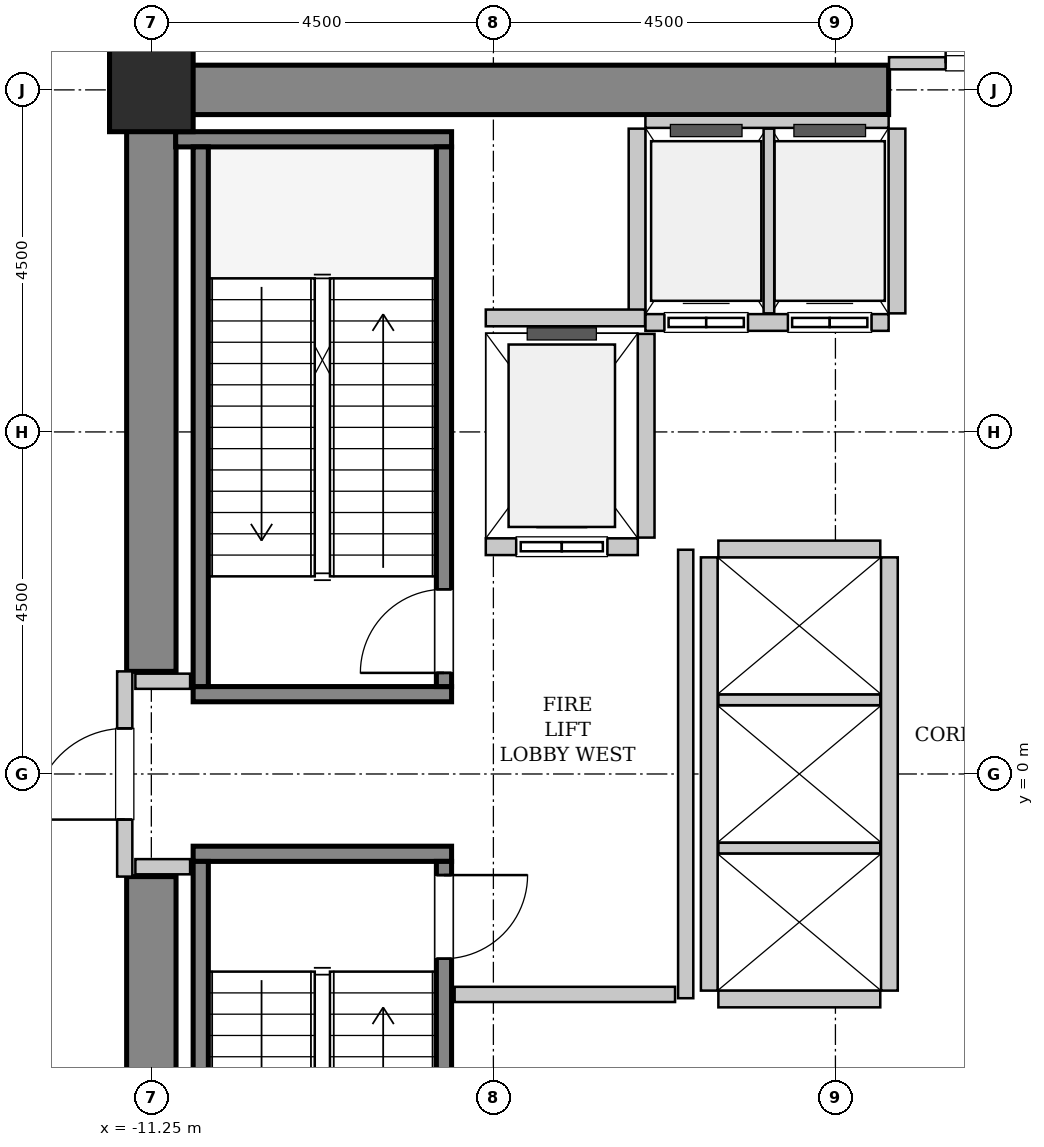
"""IFC4 building model, lengths in metres.
Left out: names, types, materials, properties, quantities, classifications, styles, units other than length and angle.
Written with IfcOpenShell. Run it as: python <this file> out.ifc"""

import sys

from ifc_helpers import new_model, si_unit, direction, frame, frame_2d, origin, origin_2d, place, context, subcontext, project, spatial, rectangle, hollow_rectangle, extrude, source, transform, mapped, element, fill, save


model = new_model("IFC4")
c1 = context("Model", 3, precision=1e-05, world=origin(), true_north=direction((0.0, 1.0)))
c2 = subcontext(c1, "Body", "Model", "MODEL_VIEW")
j1 = project(units=[si_unit("LENGTHUNIT", "METRE"), si_unit("PLANEANGLEUNIT", "RADIAN")], contexts=[c1])
p1 = place(None, origin())
s1 = spatial("IfcSite", under=j1, at=p1, CompositionType="ELEMENT")
p2 = place(p1, origin())
s2 = spatial("IfcBuilding", under=s1, at=p2, CompositionType="ELEMENT")
p3 = place(p2, frame((0.0, 0.0, 27.6)))
s3 = spatial("IfcBuildingStorey", under=s2, at=p3, CompositionType="ELEMENT", Elevation=27.6)
m1 = source(origin(), c2, "Body", "SweptSolid", [
    extrude(rectangle(XDim=10.025, YDim=0.65, at=frame_2d((5.012, 0.0))), origin(), (0.0, 0.0, 1.0), 5.4),
])
p4 = place(p3, frame((-11.575, 9.0, 0.0), z_axis=(0.0, 0.0, 1.0), x_axis=(1.0, 0.0, 0.0)))
e1 = element("IfcWall", 1, at=p4, inside=s3, PredefinedType="SHEAR", context=c2, shape_type="MappedRepresentation", body=[
    mapped(m1, transform((0.0, 0.0, 0.0), x_axis=(1.0, 0.0, 0.0), y_axis=(0.0, 1.0, 0.0), z_axis=(0.0, 0.0, 1.0), scale=1.0)),
])
m2 = source(origin(), c2, "Body", "SweptSolid", [
    extrude(rectangle(XDim=7.325, YDim=0.65, at=frame_2d((3.663, 0.0))), origin(), (0.0, 0.0, 1.0), 5.4),
])
for number, where, z_axis, x_axis in (
    (2, (-11.25, -8.675, 0.0), (0.0, 0.0, 1.0), (0.0, 1.0, 0.0)),
    (3, (-11.25, 1.35, 0.0), (0.0, 0.0, 1.0), (0.0, 1.0, 0.0)),
):
    element("IfcWall", number, at=place(p3, frame(where, z_axis=z_axis, x_axis=x_axis)), inside=s3, PredefinedType="SHEAR", context=c2, shape_type="MappedRepresentation", body=[
        mapped(m2, transform((0.0, 0.0, 0.0), x_axis=(1.0, 0.0, 0.0), y_axis=(0.0, 1.0, 0.0), z_axis=(0.0, 0.0, 1.0), scale=1.0)),
    ])
m3 = source(origin(), c2, "Body", "SweptSolid", [
    extrude(hollow_rectangle(XDim=1.1, YDim=1.1, WallThickness=0.055, InnerFilletRadius=0.055, OuterFilletRadius=0.11, at=origin_2d()), origin(), (0.0, 0.0, 1.0), 5.4),
])
p5 = place(p3, frame((-11.25, 9.0, 0.0), z_axis=(0.0, 0.0, 1.0), x_axis=(1.0, 0.0, 0.0)))
e4 = element("IfcColumn", 4, at=p5, inside=s3, PredefinedType="COLUMN", context=c2, shape_type="MappedRepresentation", body=[
    mapped(m3, transform((0.0, 0.0, 0.0), x_axis=(1.0, 0.0, 0.0), y_axis=(0.0, 1.0, 0.0), z_axis=(0.0, 0.0, 1.0), scale=1.0)),
])
m4 = source(origin(), c2, "Body", "SweptSolid", [
    extrude(rectangle(XDim=3.4, YDim=0.2, at=frame_2d((1.7, 0.0))), origin(), (0.0, 0.0, 1.0), 5.4),
])
p6 = place(p3, frame((-7.3, 1.05, 0.0), z_axis=(0.0, 0.0, 1.0), x_axis=(-1.0, 0.0, 0.0)))
e5 = element("IfcWall", 5, at=p6, inside=s3, PredefinedType="SOLIDWALL", context=c2, shape_type="MappedRepresentation", body=[
    mapped(m4, transform((0.0, 0.0, 0.0), x_axis=(1.0, 0.0, 0.0), y_axis=(0.0, 1.0, 0.0), z_axis=(0.0, 0.0, 1.0), scale=1.0)),
])
m5 = source(origin(), c2, "Body", "SweptSolid", [
    extrude(rectangle(XDim=3.63, YDim=0.2, at=frame_2d((1.815, 0.0))), origin(), (0.0, 0.0, 1.0), 5.4),
])
p7 = place(p3, frame((-7.3, 8.35, 0.0), z_axis=(0.0, 0.0, 1.0), x_axis=(-1.0, 0.0, 0.0)))
e6 = element("IfcWall", 6, at=p7, inside=s3, PredefinedType="SOLIDWALL", context=c2, shape_type="MappedRepresentation", body=[
    mapped(m5, transform((0.0, 0.0, 0.0), x_axis=(1.0, 0.0, 0.0), y_axis=(0.0, 1.0, 0.0), z_axis=(0.0, 0.0, 1.0), scale=1.0)),
])
m6 = source(origin(), c2, "Body", "SweptSolid", [
    extrude(rectangle(XDim=7.1, YDim=0.2, at=frame_2d((3.55, 0.0))), origin(), (0.0, 0.0, 1.0), 5.4),
])
p8 = place(p3, frame((-7.4, 1.15, 0.0), z_axis=(0.0, 0.0, 1.0), x_axis=(0.0, 1.0, 0.0)))
e7 = element("IfcWall", 7, at=p8, inside=s3, PredefinedType="SOLIDWALL", context=c2, shape_type="MappedRepresentation", body=[
    mapped(m6, transform((0.0, 0.0, 0.0), x_axis=(1.0, 0.0, 0.0), y_axis=(0.0, 1.0, 0.0), z_axis=(0.0, 0.0, 1.0), scale=1.0)),
])
p9 = place(p8, frame((0.18, 0.0, 0.0)))
e8 = element("IfcOpeningElement", 8, at=p9, cuts=e7, PredefinedType="OPENING", context=c2, shape_type="SweptSolid", body=[
    extrude(rectangle(XDim=1.1, YDim=2.15, at=frame_2d((0.55, 1.075))), frame((0.0, 0.11, 0.0), z_axis=(0.0, -1.0, 0.0), x_axis=(1.0, 0.0, 0.0)), (0.0, 0.0, 1.0), 0.22),
])
p10 = place(p3, frame((-10.6, 1.15, 0.0), z_axis=(0.0, 0.0, 1.0), x_axis=(0.0, 1.0, 0.0)))
e9 = element("IfcWall", 9, at=p10, inside=s3, PredefinedType="SOLIDWALL", context=c2, shape_type="MappedRepresentation", body=[
    mapped(m6, transform((0.0, 0.0, 0.0), x_axis=(1.0, 0.0, 0.0), y_axis=(0.0, 1.0, 0.0), z_axis=(0.0, 0.0, 1.0), scale=1.0)),
])
p11 = place(p3, frame((-10.7, -1.05, 0.0), z_axis=(0.0, 0.0, 1.0), x_axis=(1.0, 0.0, 0.0)))
e10 = element("IfcWall", 10, at=p11, inside=s3, PredefinedType="SOLIDWALL", context=c2, shape_type="MappedRepresentation", body=[
    mapped(m4, transform((0.0, 0.0, 0.0), x_axis=(1.0, 0.0, 0.0), y_axis=(0.0, 1.0, 0.0), z_axis=(0.0, 0.0, 1.0), scale=1.0)),
])
p12 = place(p3, frame((-10.6, -1.15, 0.0), z_axis=(0.0, 0.0, 1.0), x_axis=(0.0, -1.0, 0.0)))
e11 = element("IfcWall", 11, at=p12, inside=s3, PredefinedType="SOLIDWALL", context=c2, shape_type="MappedRepresentation", body=[
    mapped(m6, transform((0.0, 0.0, 0.0), x_axis=(1.0, 0.0, 0.0), y_axis=(0.0, 1.0, 0.0), z_axis=(0.0, 0.0, 1.0), scale=1.0)),
])
p13 = place(p3, frame((-7.4, -1.15, 0.0), z_axis=(0.0, 0.0, 1.0), x_axis=(0.0, -1.0, 0.0)))
e12 = element("IfcWall", 12, at=p13, inside=s3, PredefinedType="SOLIDWALL", context=c2, shape_type="MappedRepresentation", body=[
    mapped(m6, transform((0.0, 0.0, 0.0), x_axis=(1.0, 0.0, 0.0), y_axis=(0.0, 1.0, 0.0), z_axis=(0.0, 0.0, 1.0), scale=1.0)),
])
p14 = place(p13, frame((0.18, 0.0, 0.0)))
e13 = element("IfcOpeningElement", 13, at=p14, cuts=e12, PredefinedType="OPENING", context=c2, shape_type="SweptSolid", body=[
    extrude(rectangle(XDim=1.1, YDim=2.15, at=frame_2d((0.55, 1.075))), frame((0.0, 0.11, 0.0), z_axis=(0.0, -1.0, 0.0), x_axis=(1.0, 0.0, 0.0)), (0.0, 0.0, 1.0), 0.22),
])
m7 = source(origin(), c2, "Body", "SweptSolid", [
    extrude(rectangle(XDim=2.0, YDim=0.22, at=frame_2d((1.0, 0.0))), origin(), (0.0, 0.0, 1.0), 5.135),
])
p15 = place(p3, frame((-6.85, 2.99, 0.0), z_axis=(0.0, 0.0, 1.0), x_axis=(1.0, 0.0, 0.0)))
e14 = element("IfcWall", 14, at=p15, inside=s3, PredefinedType="SOLIDWALL", context=c2, shape_type="MappedRepresentation", body=[
    mapped(m7, transform((0.0, 0.0, 0.0), x_axis=(1.0, 0.0, 0.0), y_axis=(0.0, 1.0, 0.0), z_axis=(0.0, 0.0, 1.0), scale=1.0)),
])
p16 = place(p15, frame((0.4, 0.0, 0.0)))
e15 = element("IfcOpeningElement", 15, at=p16, cuts=e14, PredefinedType="OPENING", context=c2, shape_type="SweptSolid", body=[
    extrude(rectangle(XDim=1.2, YDim=2.2, at=frame_2d((0.6, 1.1))), frame((0.0, 0.12, 0.0), z_axis=(0.0, -1.0, 0.0), x_axis=(1.0, 0.0, 0.0)), (0.0, 0.0, 1.0), 0.24),
])
m8 = source(origin(), c2, "Body", "SweptSolid", [
    extrude(rectangle(XDim=2.68, YDim=0.22, at=frame_2d((1.34, 0.0))), origin(), (0.0, 0.0, 1.0), 5.135),
])
p17 = place(p3, frame((-4.74, 3.11, 0.0), z_axis=(0.0, 0.0, 1.0), x_axis=(0.0, 1.0, 0.0)))
e16 = element("IfcWall", 16, at=p17, inside=s3, PredefinedType="SOLIDWALL", context=c2, shape_type="MappedRepresentation", body=[
    mapped(m8, transform((0.0, 0.0, 0.0), x_axis=(1.0, 0.0, 0.0), y_axis=(0.0, 1.0, 0.0), z_axis=(0.0, 0.0, 1.0), scale=1.0)),
])
m9 = source(origin(), c2, "Body", "SweptSolid", [
    extrude(rectangle(XDim=3.2, YDim=0.22, at=frame_2d((1.6, 0.0))), origin(), (0.0, 0.0, 1.0), 5.135),
])
p18 = place(p3, frame((-4.75, 5.94, 0.0), z_axis=(0.0, 0.0, 1.0), x_axis=(1.0, 0.0, 0.0)))
e17 = element("IfcWall", 17, at=p18, inside=s3, PredefinedType="SOLIDWALL", context=c2, shape_type="MappedRepresentation", body=[
    mapped(m9, transform((0.0, 0.0, 0.0), x_axis=(1.0, 0.0, 0.0), y_axis=(0.0, 1.0, 0.0), z_axis=(0.0, 0.0, 1.0), scale=1.0)),
])
p19 = place(p18, frame((0.25, 0.0, 0.0)))
e18 = element("IfcOpeningElement", 18, at=p19, cuts=e17, PredefinedType="OPENING", context=c2, shape_type="SweptSolid", body=[
    extrude(rectangle(XDim=1.1, YDim=2.2, at=frame_2d((0.55, 1.1))), frame((0.0, 0.12, 0.0), z_axis=(0.0, -1.0, 0.0), x_axis=(1.0, 0.0, 0.0)), (0.0, 0.0, 1.0), 0.24),
])
p20 = place(p18, frame((1.875, 0.0, 0.0)))
e19 = element("IfcOpeningElement", 19, at=p20, cuts=e17, PredefinedType="OPENING", context=c2, shape_type="SweptSolid", body=[
    extrude(rectangle(XDim=1.1, YDim=2.2, at=frame_2d((0.55, 1.1))), frame((0.0, 0.12, 0.0), z_axis=(0.0, -1.0, 0.0), x_axis=(1.0, 0.0, 0.0)), (0.0, 0.0, 1.0), 0.24),
])
m10 = source(origin(), c2, "Body", "SweptSolid", [
    extrude(rectangle(XDim=3.2, YDim=0.16, at=frame_2d((1.6, 0.0))), origin(), (0.0, 0.0, 1.0), 4.025),
])
p21 = place(p3, frame((-1.55, 8.58, 0.0), z_axis=(0.0, 0.0, 1.0), x_axis=(-1.0, 0.0, 0.0)))
e20 = element("IfcWall", 20, at=p21, inside=s3, PredefinedType="PARTITIONING", context=c2, shape_type="MappedRepresentation", body=[
    mapped(m10, transform((0.0, 0.0, 0.0), x_axis=(1.0, 0.0, 0.0), y_axis=(0.0, 1.0, 0.0), z_axis=(0.0, 0.0, 1.0), scale=1.0)),
])
m11 = source(origin(), c2, "Body", "SweptSolid", [
    extrude(rectangle(XDim=2.43, YDim=0.22, at=frame_2d((1.215, 0.0))), origin(), (0.0, 0.0, 1.0), 5.135),
])
p22 = place(p3, frame((-4.86, 8.49, 0.0), z_axis=(0.0, 0.0, 1.0), x_axis=(0.0, -1.0, 0.0)))
e21 = element("IfcWall", 21, at=p22, inside=s3, PredefinedType="SOLIDWALL", context=c2, shape_type="MappedRepresentation", body=[
    mapped(m11, transform((0.0, 0.0, 0.0), x_axis=(1.0, 0.0, 0.0), y_axis=(0.0, 1.0, 0.0), z_axis=(0.0, 0.0, 1.0), scale=1.0)),
])
m12 = source(origin(), c2, "Body", "SweptSolid", [
    extrude(rectangle(XDim=2.43, YDim=0.14, at=frame_2d((1.215, 0.0))), origin(), (0.0, 0.0, 1.0), 5.135),
])
p23 = place(p3, frame((-3.125, 6.06, 0.0), z_axis=(0.0, 0.0, 1.0), x_axis=(0.0, 1.0, 0.0)))
e22 = element("IfcWall", 22, at=p23, inside=s3, PredefinedType="PARTITIONING", context=c2, shape_type="MappedRepresentation", body=[
    mapped(m12, transform((0.0, 0.0, 0.0), x_axis=(1.0, 0.0, 0.0), y_axis=(0.0, 1.0, 0.0), z_axis=(0.0, 0.0, 1.0), scale=1.0)),
])
p24 = place(p3, frame((-1.44, 6.06, 0.0), z_axis=(0.0, 0.0, 1.0), x_axis=(0.0, 1.0, 0.0)))
e23 = element("IfcWall", 23, at=p24, inside=s3, PredefinedType="SOLIDWALL", context=c2, shape_type="MappedRepresentation", body=[
    mapped(m11, transform((0.0, 0.0, 0.0), x_axis=(1.0, 0.0, 0.0), y_axis=(0.0, 1.0, 0.0), z_axis=(0.0, 0.0, 1.0), scale=1.0)),
])
m13 = source(origin(), c2, "Body", "SweptSolid", [
    extrude(rectangle(XDim=5.7, YDim=0.22, at=frame_2d((2.85, 0.0))), origin(), (0.0, 0.0, 1.0), 5.135),
])
for number, where, z_axis, x_axis in (
    (24, (-1.54, -2.85, 0.0), (0.0, 0.0, 1.0), (0.0, 1.0, 0.0)),
    (25, (-3.91, 2.85, 0.0), (0.0, 0.0, 1.0), (0.0, -1.0, 0.0)),
):
    element("IfcWall", number, at=place(p3, frame(where, z_axis=z_axis, x_axis=x_axis)), inside=s3, PredefinedType="SOLIDWALL", context=c2, shape_type="MappedRepresentation", body=[
        mapped(m13, transform((0.0, 0.0, 0.0), x_axis=(1.0, 0.0, 0.0), y_axis=(0.0, 1.0, 0.0), z_axis=(0.0, 0.0, 1.0), scale=1.0)),
    ])
m14 = source(origin(), c2, "Body", "SweptSolid", [
    extrude(rectangle(XDim=2.13, YDim=0.22, at=frame_2d((1.065, 0.0))), origin(), (0.0, 0.0, 1.0), 5.135),
])
p25 = place(p3, frame((-3.79, -2.96, 0.0), z_axis=(0.0, 0.0, 1.0), x_axis=(1.0, 0.0, 0.0)))
e26 = element("IfcWall", 26, at=p25, inside=s3, PredefinedType="SOLIDWALL", context=c2, shape_type="MappedRepresentation", body=[
    mapped(m14, transform((0.0, 0.0, 0.0), x_axis=(1.0, 0.0, 0.0), y_axis=(0.0, 1.0, 0.0), z_axis=(0.0, 0.0, 1.0), scale=1.0)),
])
m15 = source(origin(), c2, "Body", "SweptSolid", [
    extrude(rectangle(XDim=2.13, YDim=0.14, at=frame_2d((1.065, 0.0))), origin(), (0.0, 0.0, 1.0), 5.135),
])
for number, where, z_axis, x_axis in (
    (27, (-3.79, -0.975, 0.0), (0.0, 0.0, 1.0), (1.0, 0.0, 0.0)),
    (28, (-3.79, 0.975, 0.0), (0.0, 0.0, 1.0), (1.0, 0.0, 0.0)),
):
    element("IfcWall", number, at=place(p3, frame(where, z_axis=z_axis, x_axis=x_axis)), inside=s3, PredefinedType="PARTITIONING", context=c2, shape_type="MappedRepresentation", body=[
        mapped(m15, transform((0.0, 0.0, 0.0), x_axis=(1.0, 0.0, 0.0), y_axis=(0.0, 1.0, 0.0), z_axis=(0.0, 0.0, 1.0), scale=1.0)),
    ])
p26 = place(p3, frame((-1.66, 2.96, 0.0), z_axis=(0.0, 0.0, 1.0), x_axis=(-1.0, 0.0, 0.0)))
e29 = element("IfcWall", 29, at=p26, inside=s3, PredefinedType="SOLIDWALL", context=c2, shape_type="MappedRepresentation", body=[
    mapped(m14, transform((0.0, 0.0, 0.0), x_axis=(1.0, 0.0, 0.0), y_axis=(0.0, 1.0, 0.0), z_axis=(0.0, 0.0, 1.0), scale=1.0)),
])
m16 = source(origin(), c2, "Body", "SweptSolid", [
    extrude(rectangle(XDim=2.095, YDim=0.22, at=frame_2d((1.048, 0.0))), origin(), (0.0, 0.0, 1.0), 5.135),
])
p27 = place(p3, frame((-6.85, 6.0, 0.0), z_axis=(0.0, 0.0, 1.0), x_axis=(1.0, 0.0, 0.0)))
e30 = element("IfcWall", 30, at=p27, inside=s3, PredefinedType="SOLIDWALL", context=c2, shape_type="MappedRepresentation", body=[
    mapped(m16, transform((0.0, 0.0, 0.0), x_axis=(1.0, 0.0, 0.0), y_axis=(0.0, 1.0, 0.0), z_axis=(0.0, 0.0, 1.0), scale=1.0)),
])
m17 = source(origin(), c2, "Body", "SweptSolid", [
    extrude(rectangle(XDim=2.7, YDim=0.2, at=frame_2d((1.35, 0.0))), origin(), (0.0, 0.0, 1.0), 4.025),
])
p28 = place(p3, frame((-11.6, -1.35, 0.0), z_axis=(0.0, 0.0, 1.0), x_axis=(0.0, 1.0, 0.0)))
e31 = element("IfcWall", 31, at=p28, inside=s3, PredefinedType="PARTITIONING", context=c2, shape_type="MappedRepresentation", body=[
    mapped(m17, transform((0.0, 0.0, 0.0), x_axis=(1.0, 0.0, 0.0), y_axis=(0.0, 1.0, 0.0), z_axis=(0.0, 0.0, 1.0), scale=1.0)),
])
p29 = place(p28, frame((0.75, 0.0, 0.0)))
e32 = element("IfcOpeningElement", 32, at=p29, cuts=e31, PredefinedType="OPENING", context=c2, shape_type="SweptSolid", body=[
    extrude(rectangle(XDim=1.2, YDim=2.15, at=frame_2d((0.6, 1.075))), frame((0.0, 0.11, 0.0), z_axis=(0.0, -1.0, 0.0), x_axis=(1.0, 0.0, 0.0)), (0.0, 0.0, 1.0), 0.22),
])
m18 = source(origin(), c2, "Body", "SweptSolid", [
    extrude(rectangle(XDim=5.9, YDim=0.2, at=frame_2d((2.95, 0.0))), origin(), (0.0, 0.0, 1.0), 5.135),
])
p30 = place(p3, frame((-4.22, -2.95, 0.0), z_axis=(0.0, 0.0, 1.0), x_axis=(0.0, 1.0, 0.0)))
e33 = element("IfcWall", 33, at=p30, inside=s3, PredefinedType="PARTITIONING", context=c2, shape_type="MappedRepresentation", body=[
    mapped(m18, transform((0.0, 0.0, 0.0), x_axis=(1.0, 0.0, 0.0), y_axis=(0.0, 1.0, 0.0), z_axis=(0.0, 0.0, 1.0), scale=1.0)),
])
m19 = source(origin(), c2, "Body", "SweptSolid", [
    extrude(rectangle(XDim=2.9, YDim=0.2, at=frame_2d((1.45, 0.0))), origin(), (0.0, 0.0, 1.0), 5.135),
])
p31 = place(p3, frame((-7.26, -2.9, 0.0), z_axis=(0.0, 0.0, 1.0), x_axis=(1.0, 0.0, 0.0)))
e34 = element("IfcWall", 34, at=p31, inside=s3, PredefinedType="PARTITIONING", context=c2, shape_type="MappedRepresentation", body=[
    mapped(m19, transform((0.0, 0.0, 0.0), x_axis=(1.0, 0.0, 0.0), y_axis=(0.0, 1.0, 0.0), z_axis=(0.0, 0.0, 1.0), scale=1.0)),
])
m20 = source(origin(), c2, "Body", "SweptSolid", [
    extrude(rectangle(XDim=0.72, YDim=0.2, at=frame_2d((0.36, 0.0))), origin(), (0.0, 0.0, 1.0), 5.135),
])
for number, where, z_axis, x_axis in (
    (35, (-11.46, 1.22, 0.0), (0.0, 0.0, 1.0), (1.0, 0.0, 0.0)),
    (36, (-11.46, -1.22, 0.0), (0.0, 0.0, 1.0), (1.0, 0.0, 0.0)),
):
    element("IfcWall", number, at=place(p3, frame(where, z_axis=z_axis, x_axis=x_axis)), inside=s3, PredefinedType="PARTITIONING", context=c2, shape_type="MappedRepresentation", body=[
        mapped(m20, transform((0.0, 0.0, 0.0), x_axis=(1.0, 0.0, 0.0), y_axis=(0.0, 1.0, 0.0), z_axis=(0.0, 0.0, 1.0), scale=1.0)),
    ])
m21 = source(origin(), c2, "Body", "SweptSolid", [
    extrude(rectangle(XDim=3.09, YDim=0.16, at=frame_2d((1.545, 0.0))), origin(), (0.0, 0.0, 1.0), 4.025),
])
p32 = place(p3, frame((-1.545, 9.35, 0.0), z_axis=(0.0, 0.0, 1.0), x_axis=(1.0, 0.0, 0.0)))
e37 = element("IfcWall", 37, at=p32, inside=s3, PredefinedType="PARTITIONING", context=c2, shape_type="MappedRepresentation", body=[
    mapped(m21, transform((0.0, 0.0, 0.0), x_axis=(1.0, 0.0, 0.0), y_axis=(0.0, 1.0, 0.0), z_axis=(0.0, 0.0, 1.0), scale=1.0)),
])
p33 = place(p32, frame((0.745, 0.0, 0.0)))
e38 = element("IfcOpeningElement", 38, at=p33, cuts=e37, PredefinedType="OPENING", context=c2, shape_type="SweptSolid", body=[
    extrude(rectangle(XDim=1.6, YDim=2.3, at=frame_2d((0.8, 1.15))), frame((0.0, 0.09, 0.0), z_axis=(0.0, -1.0, 0.0), x_axis=(1.0, 0.0, 0.0)), (0.0, 0.0, 1.0), 0.18),
])
m22 = source(origin(), c2, "Body", "SweptSolid", [
    extrude(rectangle(XDim=1.1, YDim=2.15, at=frame_2d((0.55, 1.075))), frame((0.0, 0.025, 0.0), z_axis=(0.0, -1.0, 0.0), x_axis=(1.0, 0.0, 0.0)), (0.0, 0.0, 1.0), 0.05),
])
p34 = place(p9, origin())
e39 = element("IfcDoor", 39, at=p34, inside=s3, OperationType="SINGLE_SWING_LEFT", PredefinedType="DOOR", context=c2, shape_type="MappedRepresentation", body=[
    mapped(m22, transform((0.0, 0.0, 0.0), x_axis=(1.0, 0.0, 0.0), y_axis=(0.0, 1.0, 0.0), z_axis=(0.0, 0.0, 1.0), scale=1.0)),
])
fill(e8, e39)
p35 = place(p14, origin())
e40 = element("IfcDoor", 40, at=p35, inside=s3, OperationType="SINGLE_SWING_LEFT", PredefinedType="DOOR", context=c2, shape_type="MappedRepresentation", body=[
    mapped(m22, transform((0.0, 0.0, 0.0), x_axis=(1.0, 0.0, 0.0), y_axis=(0.0, 1.0, 0.0), z_axis=(0.0, 0.0, 1.0), scale=1.0)),
])
fill(e13, e40)
m23 = source(origin(), c2, "Body", "SweptSolid", [
    extrude(rectangle(XDim=1.2, YDim=2.2, at=frame_2d((0.6, 1.1))), frame((0.0, 0.025, 0.0), z_axis=(0.0, -1.0, 0.0), x_axis=(1.0, 0.0, 0.0)), (0.0, 0.0, 1.0), 0.05),
])
p36 = place(p16, origin())
e41 = element("IfcDoor", 41, at=p36, inside=s3, OperationType="SLIDING_TO_LEFT", PredefinedType="DOOR", context=c2, shape_type="MappedRepresentation", body=[
    mapped(m23, transform((0.0, 0.0, 0.0), x_axis=(1.0, 0.0, 0.0), y_axis=(0.0, 1.0, 0.0), z_axis=(0.0, 0.0, 1.0), scale=1.0)),
])
fill(e15, e41)
m24 = source(origin(), c2, "Body", "SweptSolid", [
    extrude(rectangle(XDim=1.1, YDim=2.2, at=frame_2d((0.55, 1.1))), frame((0.0, 0.025, 0.0), z_axis=(0.0, -1.0, 0.0), x_axis=(1.0, 0.0, 0.0)), (0.0, 0.0, 1.0), 0.05),
])
p37 = place(p19, origin())
e42 = element("IfcDoor", 42, at=p37, inside=s3, OperationType="DOUBLE_DOOR_SLIDING", PredefinedType="DOOR", context=c2, shape_type="MappedRepresentation", body=[
    mapped(m24, transform((0.0, 0.0, 0.0), x_axis=(1.0, 0.0, 0.0), y_axis=(0.0, 1.0, 0.0), z_axis=(0.0, 0.0, 1.0), scale=1.0)),
])
fill(e18, e42)
p38 = place(p20, origin())
e43 = element("IfcDoor", 43, at=p38, inside=s3, OperationType="DOUBLE_DOOR_SLIDING", PredefinedType="DOOR", context=c2, shape_type="MappedRepresentation", body=[
    mapped(m24, transform((0.0, 0.0, 0.0), x_axis=(1.0, 0.0, 0.0), y_axis=(0.0, 1.0, 0.0), z_axis=(0.0, 0.0, 1.0), scale=1.0)),
])
fill(e19, e43)
m25 = source(origin(), c2, "Body", "SweptSolid", [
    extrude(rectangle(XDim=1.2, YDim=2.15, at=frame_2d((0.6, 1.075))), frame((0.0, 0.025, 0.0), z_axis=(0.0, -1.0, 0.0), x_axis=(1.0, 0.0, 0.0)), (0.0, 0.0, 1.0), 0.05),
])
p39 = place(p29, origin())
e44 = element("IfcDoor", 44, at=p39, inside=s3, OperationType="SINGLE_SWING_LEFT", PredefinedType="DOOR", context=c2, shape_type="MappedRepresentation", body=[
    mapped(m25, transform((0.0, 0.0, 0.0), x_axis=(1.0, 0.0, 0.0), y_axis=(0.0, 1.0, 0.0), z_axis=(0.0, 0.0, 1.0), scale=1.0)),
])
fill(e32, e44)
m26 = source(origin(), c2, "Body", "SweptSolid", [
    extrude(rectangle(XDim=1.6, YDim=2.3, at=frame_2d((0.8, 1.15))), frame((0.0, 0.025, 0.0), z_axis=(0.0, -1.0, 0.0), x_axis=(1.0, 0.0, 0.0)), (0.0, 0.0, 1.0), 0.05),
])
p40 = place(p33, origin())
e45 = element("IfcDoor", 45, at=p40, inside=s3, OperationType="DOUBLE_DOOR_SINGLE_SWING", PredefinedType="DOOR", context=c2, shape_type="MappedRepresentation", body=[
    mapped(m26, transform((0.0, 0.0, 0.0), x_axis=(1.0, 0.0, 0.0), y_axis=(0.0, 1.0, 0.0), z_axis=(0.0, 0.0, 1.0), scale=1.0)),
])
fill(e38, e45)
save(model, sys.argv[1])
